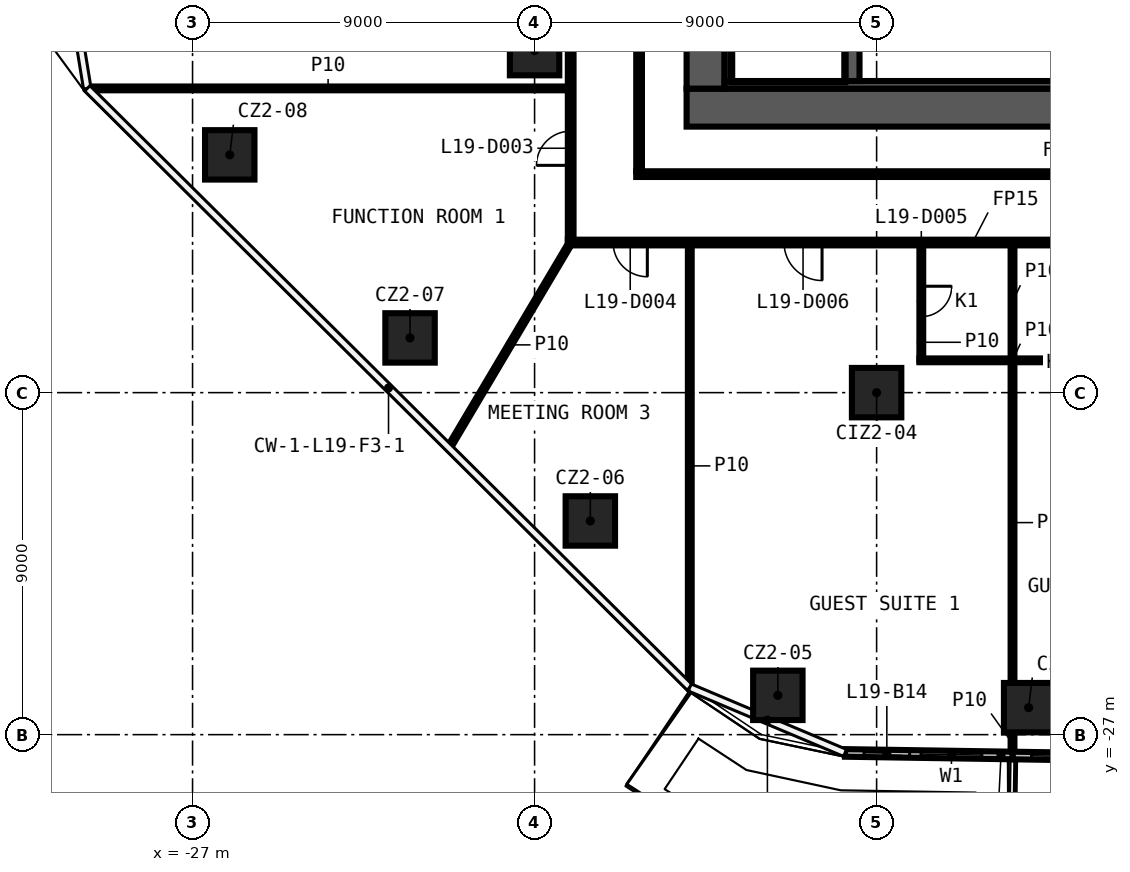
"""IFC4 building model, lengths in metres.
Left out: names, types, materials, properties, quantities, classifications, styles, units other than length and angle.
Written with IfcOpenShell. Run it as: python <this file> out.ifc"""

import sys

from ifc_helpers import new_model, si_unit, direction, frame, frame_2d, origin, origin_2d, place, context, subcontext, project, spatial, rectangle, extrude, element, fill, save


model = new_model("IFC4")
c1 = context("Model", 3, precision=1e-05, world=origin(), true_north=direction((0.0, 1.0)))
c2 = subcontext(c1, "Body", "Model", "MODEL_VIEW")
j1 = project(units=[si_unit("LENGTHUNIT", "METRE"), si_unit("PLANEANGLEUNIT", "RADIAN")], contexts=[c1])
p1 = place(None, origin())
s1 = spatial("IfcSite", under=j1, at=p1, CompositionType="ELEMENT")
p2 = place(p1, origin())
s2 = spatial("IfcBuilding", under=s1, at=p2, CompositionType="ELEMENT")
p3 = place(p2, frame((0.0, 0.0, 95.2)))
s3 = spatial("IfcBuildingStorey", under=s2, at=p3, CompositionType="ELEMENT", Elevation=95.2)
for number, where, z_axis, x_axis in (
    (1, (-5.0, -26.29, 0.0), (0.0, 0.0, 1.0), (1.0, 0.0, 0.0)),
    (2, (-11.599, -25.966, 0.0), (0.0, 0.0, 1.0), (1.0, 0.0, 0.0)),
    (3, (-16.533, -21.377, 0.0), (0.0, 0.0, 1.0), (1.0, 0.0, 0.0)),
    (4, (-21.277, -16.56, 0.0), (0.0, 0.0, 1.0), (1.0, 0.0, 0.0)),
    (5, (-26.021, -11.743, 0.0), (0.0, 0.0, 1.0), (1.0, 0.0, 0.0)),
    (6, (-18.0, -9.0, 0.0), (0.0, 0.0, 1.0), (1.0, 0.0, 0.0)),
    (7, (-9.0, -18.0, 0.0), (0.0, 0.0, 1.0), (1.0, 0.0, 0.0)),
):
    element("IfcColumn", number, at=place(p3, frame(where, z_axis=z_axis, x_axis=x_axis)), inside=s3, PredefinedType="COLUMN", context=c2, shape_type="SweptSolid", body=[
        extrude(rectangle(XDim=1.3, YDim=1.3, at=origin_2d()), origin(), (0.0, 0.0, 1.0), 3.25),
    ])
p4 = place(p3, frame((-7.874, -17.15, 0.0), z_axis=(0.0, 0.0, 1.0), x_axis=(1.0, 0.0, 0.0)))
e8 = element("IfcWall", 8, at=p4, inside=s3, PredefinedType="PARTITIONING", context=c2, shape_type="SweptSolid", body=[
    extrude(rectangle(XDim=4.9, YDim=0.1, at=frame_2d((2.45, 0.0))), origin(), (0.0, 0.0, 1.0), 3.25),
])
p5 = place(p3, frame((17.125, -14.05, 0.0), z_axis=(0.0, 0.0, 1.0), x_axis=(-1.0, 0.0, 0.0)))
e9 = element("IfcWall", 9, at=p5, inside=s3, PredefinedType="PARTITIONING", context=c2, shape_type="SweptSolid", body=[
    extrude(rectangle(XDim=34.25, YDim=0.15, at=frame_2d((17.125, 0.0))), origin(), (0.0, 0.0, 1.0), 3.25),
])
p6 = place(p5, frame((32.158, 0.0, 0.0)))
e10 = element("IfcOpeningElement", 10, at=p6, cuts=e9, PredefinedType="OPENING", context=c2, shape_type="SweptSolid", body=[
    extrude(rectangle(XDim=0.9, YDim=2.1, at=frame_2d((0.45, 1.05))), frame((0.0, 0.085, 0.0), z_axis=(0.0, -1.0, 0.0), x_axis=(1.0, 0.0, 0.0)), (0.0, 0.0, 1.0), 0.17),
])
p7 = place(p5, frame((27.561, 0.0, 0.0)))
e11 = element("IfcOpeningElement", 11, at=p7, cuts=e9, PredefinedType="OPENING", context=c2, shape_type="SweptSolid", body=[
    extrude(rectangle(XDim=1.0, YDim=2.1, at=frame_2d((0.5, 1.05))), frame((0.0, 0.085, 0.0), z_axis=(0.0, -1.0, 0.0), x_axis=(1.0, 0.0, 0.0)), (0.0, 0.0, 1.0), 0.17),
])
p8 = place(p5, frame((18.64, 0.0, 0.0)))
e12 = element("IfcOpeningElement", 12, at=p8, cuts=e9, PredefinedType="OPENING", context=c2, shape_type="SweptSolid", body=[
    extrude(rectangle(XDim=1.0, YDim=2.1, at=frame_2d((0.5, 1.05))), frame((0.0, 0.085, 0.0), z_axis=(0.0, -1.0, 0.0), x_axis=(1.0, 0.0, 0.0)), (0.0, 0.0, 1.0), 0.17),
])
p9 = place(p5, frame((16.624, 0.0, 0.0)))
e13 = element("IfcOpeningElement", 13, at=p9, cuts=e9, PredefinedType="OPENING", context=c2, shape_type="SweptSolid", body=[
    extrude(rectangle(XDim=1.0, YDim=2.1, at=frame_2d((0.5, 1.05))), frame((0.0, 0.085, 0.0), z_axis=(0.0, -1.0, 0.0), x_axis=(1.0, 0.0, 0.0)), (0.0, 0.0, 1.0), 0.17),
])
p10 = place(p5, frame((9.807, 0.0, 0.0)))
e14 = element("IfcOpeningElement", 14, at=p10, cuts=e9, PredefinedType="OPENING", context=c2, shape_type="SweptSolid", body=[
    extrude(rectangle(XDim=1.0, YDim=2.1, at=frame_2d((0.5, 1.05))), frame((0.0, 0.085, 0.0), z_axis=(0.0, -1.0, 0.0), x_axis=(1.0, 0.0, 0.0)), (0.0, 0.0, 1.0), 0.17),
])
p11 = place(p5, frame((7.795, 0.0, 0.0)))
e15 = element("IfcOpeningElement", 15, at=p11, cuts=e9, PredefinedType="OPENING", context=c2, shape_type="SweptSolid", body=[
    extrude(rectangle(XDim=1.0, YDim=2.1, at=frame_2d((0.5, 1.05))), frame((0.0, 0.085, 0.0), z_axis=(0.0, -1.0, 0.0), x_axis=(1.0, 0.0, 0.0)), (0.0, 0.0, 1.0), 0.17),
])
p12 = place(p5, frame((1.119, 0.0, 0.0)))
e16 = element("IfcOpeningElement", 16, at=p12, cuts=e9, PredefinedType="OPENING", context=c2, shape_type="SweptSolid", body=[
    extrude(rectangle(XDim=1.0, YDim=2.1, at=frame_2d((0.5, 1.05))), frame((0.0, 0.085, 0.0), z_axis=(0.0, -1.0, 0.0), x_axis=(1.0, 0.0, 0.0)), (0.0, 0.0, 1.0), 0.17),
])
p13 = place(p3, frame((-15.325, -12.25, 0.0), z_axis=(0.0, 0.0, 1.0), x_axis=(1.0, 0.0, 0.0)))
e17 = element("IfcWall", 17, at=p13, inside=s3, PredefinedType="PARTITIONING", context=c2, shape_type="SweptSolid", body=[
    extrude(rectangle(XDim=22.6, YDim=0.15, at=frame_2d((11.3, 0.0))), origin(), (0.0, 0.0, 1.0), 3.25),
])
p14 = place(p3, frame((-29.742, -9.994, 0.0), z_axis=(0.0, 0.0, 1.0), x_axis=(1.0, 0.0, 0.0)))
e18 = element("IfcWall", 18, at=p14, inside=s3, PredefinedType="PARTITIONING", context=c2, shape_type="SweptSolid", body=[
    extrude(rectangle(XDim=12.617, YDim=0.1, at=frame_2d((6.308, 0.0))), origin(), (0.0, 0.0, 1.0), 3.25),
])
p15 = place(p3, frame((-20.246, -19.436, 0.0), z_axis=(0.0, 0.0, 1.0), x_axis=(0.510253226363, 0.86002421186, 0.0)))
e19 = element("IfcWall", 19, at=p15, inside=s3, PredefinedType="PARTITIONING", context=c2, shape_type="SweptSolid", body=[
    extrude(rectangle(XDim=6.263, YDim=0.1, at=frame_2d((3.132, 0.0))), origin(), (0.0, 0.0, 1.0), 3.25),
])
p16 = place(p3, frame((-5.424, -27.529, 0.0), z_axis=(0.0, 0.0, 1.0), x_axis=(0.0, 1.0, 0.0)))
e20 = element("IfcWall", 20, at=p16, inside=s3, PredefinedType="PARTITIONING", context=c2, shape_type="SweptSolid", body=[
    extrude(rectangle(XDim=0.589, YDim=0.1, at=frame_2d((0.294, 0.0))), origin(), (0.0, 0.0, 1.0), 3.25),
])
p17 = place(p3, frame((-5.424, -25.64, 0.0), z_axis=(0.0, 0.0, 1.0), x_axis=(0.0, 1.0, 0.0)))
e21 = element("IfcWall", 21, at=p17, inside=s3, PredefinedType="PARTITIONING", context=c2, shape_type="SweptSolid", body=[
    extrude(rectangle(XDim=8.44, YDim=0.1, at=frame_2d((4.22, 0.0))), origin(), (0.0, 0.0, 1.0), 3.25),
])
p18 = place(p3, frame((-5.424, -17.1, 0.0), z_axis=(0.0, 0.0, 1.0), x_axis=(0.0, 1.0, 0.0)))
e22 = element("IfcWall", 22, at=p18, inside=s3, PredefinedType="PARTITIONING", context=c2, shape_type="SweptSolid", body=[
    extrude(rectangle(XDim=2.975, YDim=0.1, at=frame_2d((1.488, 0.0))), origin(), (0.0, 0.0, 1.0), 3.25),
])
p19 = place(p3, frame((-7.824, -14.125, 0.0), z_axis=(0.0, 0.0, 1.0), x_axis=(0.0, -1.0, 0.0)))
e23 = element("IfcWall", 23, at=p19, inside=s3, PredefinedType="PARTITIONING", context=c2, shape_type="SweptSolid", body=[
    extrude(rectangle(XDim=3.025, YDim=0.1, at=frame_2d((1.512, 0.0))), origin(), (0.0, 0.0, 1.0), 3.25),
])
p20 = place(p19, frame((1.075, 0.0, 0.0)))
e24 = element("IfcOpeningElement", 24, at=p20, cuts=e23, PredefinedType="OPENING", context=c2, shape_type="SweptSolid", body=[
    extrude(rectangle(XDim=0.8, YDim=2.1, at=frame_2d((0.4, 1.05))), frame((0.0, 0.06, 0.0), z_axis=(0.0, -1.0, 0.0), x_axis=(1.0, 0.0, 0.0)), (0.0, 0.0, 1.0), 0.12),
])
p21 = place(p3, frame((-13.916, -25.73, 0.0), z_axis=(0.0, 0.0, 1.0), x_axis=(0.0, 1.0, 0.0)))
e25 = element("IfcWall", 25, at=p21, inside=s3, PredefinedType="PARTITIONING", context=c2, shape_type="SweptSolid", body=[
    extrude(rectangle(XDim=11.605, YDim=0.1, at=frame_2d((5.802, 0.0))), origin(), (0.0, 0.0, 1.0), 3.25),
])
p22 = place(p3, frame((-15.25, 12.175, 0.0), z_axis=(0.0, 0.0, 1.0), x_axis=(0.0, -1.0, 0.0)))
e26 = element("IfcWall", 26, at=p22, inside=s3, PredefinedType="PARTITIONING", context=c2, shape_type="SweptSolid", body=[
    extrude(rectangle(XDim=24.35, YDim=0.15, at=frame_2d((12.175, 0.0))), origin(), (0.0, 0.0, 1.0), 3.25),
])
p23 = place(p22, frame((11.725, 0.0, 0.0)))
e27 = element("IfcOpeningElement", 27, at=p23, cuts=e26, PredefinedType="OPENING", context=c2, shape_type="SweptSolid", body=[
    extrude(rectangle(XDim=0.9, YDim=2.1, at=frame_2d((0.45, 1.05))), frame((0.0, 0.085, 0.0), z_axis=(0.0, -1.0, 0.0), x_axis=(1.0, 0.0, 0.0)), (0.0, 0.0, 1.0), 0.17),
])
p24 = place(p3, frame((-17.05, -13.975, 0.0), z_axis=(0.0, 0.0, 1.0), x_axis=(0.0, 1.0, 0.0)))
e28 = element("IfcWall", 28, at=p24, inside=s3, PredefinedType="PARTITIONING", context=c2, shape_type="SweptSolid", body=[
    extrude(rectangle(XDim=27.95, YDim=0.15, at=frame_2d((13.975, 0.0))), origin(), (0.0, 0.0, 1.0), 3.25),
])
p25 = place(p24, frame((11.195, 0.0, 0.0)))
e29 = element("IfcOpeningElement", 29, at=p25, cuts=e28, PredefinedType="OPENING", context=c2, shape_type="SweptSolid", body=[
    extrude(rectangle(XDim=0.9, YDim=2.1, at=frame_2d((0.45, 1.05))), frame((0.0, 0.085, 0.0), z_axis=(0.0, -1.0, 0.0), x_axis=(1.0, 0.0, 0.0)), (0.0, 0.0, 1.0), 0.17),
])
p26 = place(p24, frame((8.57, 0.0, 0.0)))
e30 = element("IfcOpeningElement", 30, at=p26, cuts=e28, PredefinedType="OPENING", context=c2, shape_type="SweptSolid", body=[
    extrude(rectangle(XDim=0.9, YDim=2.1, at=frame_2d((0.45, 1.05))), frame((0.0, 0.085, 0.0), z_axis=(0.0, -1.0, 0.0), x_axis=(1.0, 0.0, 0.0)), (0.0, 0.0, 1.0), 0.17),
])
p27 = place(p24, frame((1.956, 0.0, 0.0)))
e31 = element("IfcOpeningElement", 31, at=p27, cuts=e28, PredefinedType="OPENING", context=c2, shape_type="SweptSolid", body=[
    extrude(rectangle(XDim=0.9, YDim=2.1, at=frame_2d((0.45, 1.05))), frame((0.0, 0.085, 0.0), z_axis=(0.0, -1.0, 0.0), x_axis=(1.0, 0.0, 0.0)), (0.0, 0.0, 1.0), 0.17),
])
p28 = place(p24, frame((25.181, 0.0, 0.0)))
e32 = element("IfcOpeningElement", 32, at=p28, cuts=e28, PredefinedType="OPENING", context=c2, shape_type="SweptSolid", body=[
    extrude(rectangle(XDim=0.9, YDim=2.1, at=frame_2d((0.45, 1.05))), frame((0.0, 0.085, 0.0), z_axis=(0.0, -1.0, 0.0), x_axis=(1.0, 0.0, 0.0)), (0.0, 0.0, 1.0), 0.17),
])
p29 = place(p24, frame((20.101, 0.0, 0.0)))
e33 = element("IfcOpeningElement", 33, at=p29, cuts=e28, PredefinedType="OPENING", context=c2, shape_type="SweptSolid", body=[
    extrude(rectangle(XDim=0.9, YDim=2.1, at=frame_2d((0.45, 1.05))), frame((0.0, 0.085, 0.0), z_axis=(0.0, -1.0, 0.0), x_axis=(1.0, 0.0, 0.0)), (0.0, 0.0, 1.0), 0.17),
])
p30 = place(p24, frame((16.206, 0.0, 0.0)))
e34 = element("IfcOpeningElement", 34, at=p30, cuts=e28, PredefinedType="OPENING", context=c2, shape_type="SweptSolid", body=[
    extrude(rectangle(XDim=0.9, YDim=2.1, at=frame_2d((0.45, 1.05))), frame((0.0, 0.085, 0.0), z_axis=(0.0, -1.0, 0.0), x_axis=(1.0, 0.0, 0.0)), (0.0, 0.0, 1.0), 0.17),
])
p31 = place(p3, frame((-5.424, -27.549, 0.0), z_axis=(0.0, 0.0, 1.0), x_axis=(0.999881101657, -0.015420199401, 0.0)))
e35 = element("IfcWall", 35, at=p31, inside=s3, PredefinedType="SOLIDWALL", context=c2, shape_type="SweptSolid", body=[
    extrude(rectangle(XDim=8.834, YDim=0.2, at=frame_2d((4.417, 0.0))), origin(), (0.0, 0.0, 1.0), 3.25),
])
p32 = place(p31, frame((0.5, 0.0, 0.6)))
e36 = element("IfcOpeningElement", 36, at=p32, cuts=e35, PredefinedType="OPENING", context=c2, shape_type="SweptSolid", body=[
    extrude(rectangle(XDim=1.6, YDim=2.4, at=frame_2d((0.8, 1.2))), frame((0.0, 0.11, 0.0), z_axis=(0.0, -1.0, 0.0), x_axis=(1.0, 0.0, 0.0)), (0.0, 0.0, 1.0), 0.22),
])
p33 = place(p31, frame((2.4, 0.0, 0.0)))
e37 = element("IfcOpeningElement", 37, at=p33, cuts=e35, PredefinedType="OPENING", context=c2, shape_type="SweptSolid", body=[
    extrude(rectangle(XDim=1.2, YDim=2.4, at=frame_2d((0.6, 1.2))), frame((0.0, 0.11, 0.0), z_axis=(0.0, -1.0, 0.0), x_axis=(1.0, 0.0, 0.0)), (0.0, 0.0, 1.0), 0.22),
])
p34 = place(p31, frame((6.417, 0.0, 0.6)))
e38 = element("IfcOpeningElement", 38, at=p34, cuts=e35, PredefinedType="OPENING", context=c2, shape_type="SweptSolid", body=[
    extrude(rectangle(XDim=1.6, YDim=2.4, at=frame_2d((0.8, 1.2))), frame((0.0, 0.11, 0.0), z_axis=(0.0, -1.0, 0.0), x_axis=(1.0, 0.0, 0.0)), (0.0, 0.0, 1.0), 0.22),
])
p35 = place(p31, frame((4.917, 0.0, 0.0)))
e39 = element("IfcOpeningElement", 39, at=p35, cuts=e35, PredefinedType="OPENING", context=c2, shape_type="SweptSolid", body=[
    extrude(rectangle(XDim=1.2, YDim=2.4, at=frame_2d((0.6, 1.2))), frame((0.0, 0.11, 0.0), z_axis=(0.0, -1.0, 0.0), x_axis=(1.0, 0.0, 0.0)), (0.0, 0.0, 1.0), 0.22),
])
p36 = place(p3, frame((-9.831, -27.481, 0.0), z_axis=(0.0, 0.0, 1.0), x_axis=(0.99988144177, -0.015398129892, 0.0)))
e40 = element("IfcWall", 40, at=p36, inside=s3, PredefinedType="SOLIDWALL", context=c2, shape_type="SweptSolid", body=[
    extrude(rectangle(XDim=4.408, YDim=0.2, at=frame_2d((2.204, 0.0))), origin(), (0.0, 0.0, 1.0), 3.25),
])
p37 = place(p36, frame((2.0, 0.0, 0.6)))
e41 = element("IfcOpeningElement", 41, at=p37, cuts=e40, PredefinedType="OPENING", context=c2, shape_type="SweptSolid", body=[
    extrude(rectangle(XDim=1.6, YDim=2.4, at=frame_2d((0.8, 1.2))), frame((0.0, 0.11, 0.0), z_axis=(0.0, -1.0, 0.0), x_axis=(1.0, 0.0, 0.0)), (0.0, 0.0, 1.0), 0.22),
])
p38 = place(p36, frame((0.5, 0.0, 0.0)))
e42 = element("IfcOpeningElement", 42, at=p38, cuts=e40, PredefinedType="OPENING", context=c2, shape_type="SweptSolid", body=[
    extrude(rectangle(XDim=1.2, YDim=2.4, at=frame_2d((0.6, 1.2))), frame((0.0, 0.11, 0.0), z_axis=(0.0, -1.0, 0.0), x_axis=(1.0, 0.0, 0.0)), (0.0, 0.0, 1.0), 0.22),
])
p39 = place(p3, frame((14.0, -10.5, 0.0), z_axis=(0.0, 0.0, 1.0), x_axis=(-1.0, 0.0, 0.0)))
e43 = element("IfcWall", 43, at=p39, inside=s3, PredefinedType="SHEAR", context=c2, shape_type="SweptSolid", body=[
    extrude(rectangle(XDim=28.0, YDim=1.0, at=frame_2d((14.0, 0.0))), origin(), (0.0, 0.0, 1.0), 3.25),
])
p40 = place(p39, frame((5.1, 0.0, 0.0)))
e44 = element("IfcOpeningElement", 44, at=p40, cuts=e43, PredefinedType="OPENING", context=c2, shape_type="SweptSolid", body=[
    extrude(rectangle(XDim=1.6, YDim=2.1, at=frame_2d((0.8, 1.05))), frame((0.0, 0.51, 0.0), z_axis=(0.0, -1.0, 0.0), x_axis=(1.0, 0.0, 0.0)), (0.0, 0.0, 1.0), 1.02),
])
p41 = place(p3, frame((-13.5, -10.0, 0.0), z_axis=(0.0, 0.0, 1.0), x_axis=(0.0, 1.0, 0.0)))
e45 = element("IfcWall", 45, at=p41, inside=s3, PredefinedType="SHEAR", context=c2, shape_type="SweptSolid", body=[
    extrude(rectangle(XDim=20.0, YDim=1.0, at=frame_2d((10.0, 0.0))), origin(), (0.0, 0.0, 1.0), 3.25),
])
p42 = place(p3, frame((6.9, -9.9, 0.0), z_axis=(0.0, 0.0, 1.0), x_axis=(-1.0, 0.0, 0.0)))
e46 = element("IfcWall", 46, at=p42, inside=s3, PredefinedType="SHEAR", context=c2, shape_type="SweptSolid", body=[
    extrude(rectangle(XDim=19.9, YDim=0.2, at=frame_2d((9.95, 0.0))), origin(), (0.0, 0.0, 1.0), 3.25),
])
p43 = place(p3, frame((-12.9, -9.8, 0.0), z_axis=(0.0, 0.0, 1.0), x_axis=(0.0, 1.0, 0.0)))
e47 = element("IfcWall", 47, at=p43, inside=s3, PredefinedType="SHEAR", context=c2, shape_type="SweptSolid", body=[
    extrude(rectangle(XDim=19.6, YDim=0.2, at=frame_2d((9.8, 0.0))), origin(), (0.0, 0.0, 1.0), 3.25),
])
p44 = place(p3, frame((-9.65, -9.8, 0.0), z_axis=(0.0, 0.0, 1.0), x_axis=(0.0, 1.0, 0.0)))
e48 = element("IfcWall", 48, at=p44, inside=s3, PredefinedType="SHEAR", context=c2, shape_type="SweptSolid", body=[
    extrude(rectangle(XDim=7.5, YDim=0.4, at=frame_2d((3.75, 0.0))), origin(), (0.0, 0.0, 1.0), 3.25),
])
p45 = place(p44, frame((5.1, 0.0, 0.0)))
e49 = element("IfcOpeningElement", 49, at=p45, cuts=e48, PredefinedType="OPENING", context=c2, shape_type="SweptSolid", body=[
    extrude(rectangle(XDim=1.2, YDim=2.1, at=frame_2d((0.6, 1.05))), frame((0.0, 0.21, 0.0), z_axis=(0.0, -1.0, 0.0), x_axis=(1.0, 0.0, 0.0)), (0.0, 0.0, 1.0), 0.42),
])
p46 = place(p27, origin())
e50 = element("IfcDoor", 50, at=p46, inside=s3, OperationType="SINGLE_SWING_LEFT", PredefinedType="DOOR", context=c2, shape_type="SweptSolid", body=[
    extrude(rectangle(XDim=0.9, YDim=2.1, at=frame_2d((0.45, 1.05))), frame((0.0, 0.025, 0.0), z_axis=(0.0, -1.0, 0.0), x_axis=(1.0, 0.0, 0.0)), (0.0, 0.0, 1.0), 0.05),
])
fill(e31, e50)
p47 = place(p6, origin())
e51 = element("IfcDoor", 51, at=p47, inside=s3, OperationType="SINGLE_SWING_RIGHT", PredefinedType="DOOR", context=c2, shape_type="SweptSolid", body=[
    extrude(rectangle(XDim=0.9, YDim=2.1, at=frame_2d((0.45, 1.05))), frame((0.0, 0.025, 0.0), z_axis=(0.0, -1.0, 0.0), x_axis=(1.0, 0.0, 0.0)), (0.0, 0.0, 1.0), 0.05),
])
fill(e10, e51)
p48 = place(p20, origin())
e52 = element("IfcDoor", 52, at=p48, inside=s3, OperationType="SINGLE_SWING_RIGHT", PredefinedType="DOOR", context=c2, shape_type="SweptSolid", body=[
    extrude(rectangle(XDim=0.8, YDim=2.1, at=frame_2d((0.4, 1.05))), frame((0.0, 0.025, 0.0), z_axis=(0.0, -1.0, 0.0), x_axis=(1.0, 0.0, 0.0)), (0.0, 0.0, 1.0), 0.05),
])
fill(e24, e52)
p49 = place(p7, origin())
e53 = element("IfcDoor", 53, at=p49, inside=s3, OperationType="SINGLE_SWING_LEFT", PredefinedType="DOOR", context=c2, shape_type="SweptSolid", body=[
    extrude(rectangle(XDim=1.0, YDim=2.1, at=frame_2d((0.5, 1.05))), frame((0.0, 0.025, 0.0), z_axis=(0.0, -1.0, 0.0), x_axis=(1.0, 0.0, 0.0)), (0.0, 0.0, 1.0), 0.05),
])
fill(e11, e53)
p50 = place(p32, origin())
e54 = element("IfcWindow", 54, at=p50, inside=s3, PartitioningType="SINGLE_PANEL", PredefinedType="WINDOW", context=c2, shape_type="SweptSolid", body=[
    extrude(rectangle(XDim=1.6, YDim=2.4, at=frame_2d((0.8, 1.2))), frame((0.0, 0.03, 0.0), z_axis=(0.0, -1.0, 0.0), x_axis=(1.0, 0.0, 0.0)), (0.0, 0.0, 1.0), 0.06),
])
fill(e36, e54)
p51 = place(p37, origin())
e55 = element("IfcWindow", 55, at=p51, inside=s3, PartitioningType="SINGLE_PANEL", PredefinedType="WINDOW", context=c2, shape_type="SweptSolid", body=[
    extrude(rectangle(XDim=1.6, YDim=2.4, at=frame_2d((0.8, 1.2))), frame((0.0, 0.03, 0.0), z_axis=(0.0, -1.0, 0.0), x_axis=(1.0, 0.0, 0.0)), (0.0, 0.0, 1.0), 0.06),
])
fill(e41, e55)
p52 = place(p38, origin())
e56 = element("IfcDoor", 56, at=p52, inside=s3, OperationType="SLIDING_TO_LEFT", PredefinedType="DOOR", context=c2, shape_type="SweptSolid", body=[
    extrude(rectangle(XDim=1.2, YDim=2.4, at=frame_2d((0.6, 1.2))), frame((0.0, 0.025, 0.0), z_axis=(0.0, -1.0, 0.0), x_axis=(1.0, 0.0, 0.0)), (0.0, 0.0, 1.0), 0.05),
])
fill(e42, e56)
save(model, sys.argv[1])
